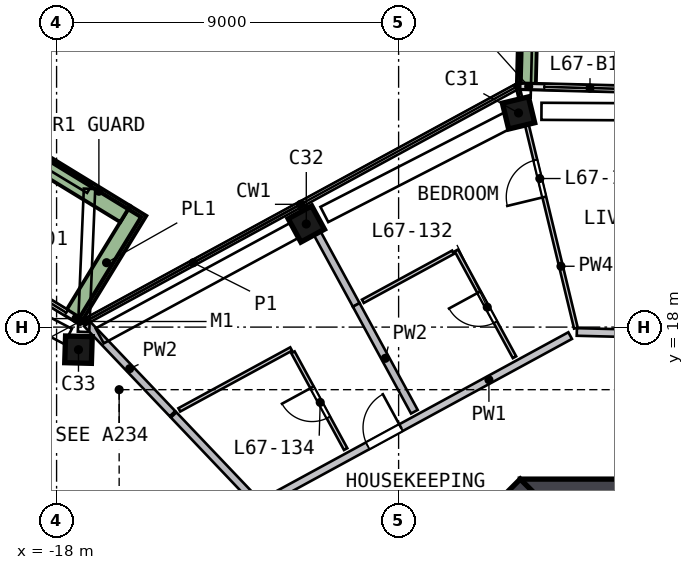
"""IFC4 building model, lengths in metres.
Left out: names, types, materials, properties, quantities, classifications, styles, units other than length and angle.
Written with IfcOpenShell. Run it as: python <this file> out.ifc"""

import sys

from ifc_helpers import new_model, si_unit, direction, frame, frame_2d, origin, origin_2d, place, context, subcontext, project, spatial, rectangle, extrude, element, fill, save


model = new_model("IFC4")
c1 = context("Model", 3, precision=1e-05, world=origin(), true_north=direction((0.0, 1.0)))
c2 = subcontext(c1, "Body", "Model", "MODEL_VIEW")
j1 = project(units=[si_unit("LENGTHUNIT", "METRE"), si_unit("PLANEANGLEUNIT", "RADIAN")], contexts=[c1])
p1 = place(None, origin())
s1 = spatial("IfcSite", under=j1, at=p1, CompositionType="ELEMENT")
p2 = place(p1, origin())
s2 = spatial("IfcBuilding", under=s1, at=p2, CompositionType="ELEMENT")
p3 = place(p2, frame((0.0, 0.0, 274.0)))
s3 = spatial("IfcBuildingStorey", under=s2, at=p3, CompositionType="ELEMENT", Elevation=274.0)
p4 = place(p3, frame((-5.709, 23.669, 0.0), z_axis=(-0.112281885, -0.028051466, 0.99328037), x_axis=(0.965671679, 0.232561936, 0.115728794)))
e1 = element("IfcColumn", 1, at=p4, inside=s3, PredefinedType="COLUMN", context=c2, shape_type="SweptSolid", body=[
    extrude(rectangle(XDim=0.7, YDim=0.7, at=origin_2d()), origin(), (0.0, 0.0, 1.0), 3.211),
])
p5 = place(p3, frame((-11.311, 20.78, 0.0), z_axis=(-0.0984061, -0.054678505, 0.993643045), x_axis=(-0.872632983, -0.475225292, -0.112572636)))
e2 = element("IfcColumn", 2, at=p5, inside=s3, PredefinedType="COLUMN", context=c2, shape_type="SweptSolid", body=[
    extrude(rectangle(XDim=0.7, YDim=0.7, at=origin_2d()), origin(), (0.0, 0.0, 1.0), 3.21),
])
p6 = place(p3, frame((-17.324, 17.506, 0.0), z_axis=(-0.082544533, -0.083076588, 0.993118664), x_axis=(0.996274725, -0.031838565, 0.080143487)))
e3 = element("IfcColumn", 3, at=p6, inside=s3, PredefinedType="COLUMN", context=c2, shape_type="SweptSolid", body=[
    extrude(rectangle(XDim=0.7, YDim=0.7, at=origin_2d()), origin(), (0.0, 0.0, 1.0), 3.212),
])
p7 = place(p3, frame((5.799, 13.775, 0.0), z_axis=(0.0, 0.0, 1.0), x_axis=(-1.0, 0.0, 0.0)))
e4 = element("IfcWall", 4, at=p7, inside=s3, PredefinedType="SHEAR", context=c2, shape_type="SweptSolid", body=[
    extrude(rectangle(XDim=11.598, YDim=0.45, at=frame_2d((5.799, 0.0))), origin(), (0.0, 0.0, 1.0), 3.5),
])
p8 = place(p7, frame((4.899, 0.0, 0.0)))
e5 = element("IfcOpeningElement", 5, at=p8, cuts=e4, PredefinedType="OPENING", context=c2, shape_type="SweptSolid", body=[
    extrude(rectangle(XDim=1.8, YDim=2.1, at=frame_2d((0.9, 1.05))), frame((0.0, 0.235, 0.0), z_axis=(0.0, -1.0, 0.0), x_axis=(1.0, 0.0, 0.0)), (0.0, 0.0, 1.0), 0.47),
])
p9 = place(p3, frame((-5.64, 13.841, 0.0), z_axis=(0.0, 0.0, 1.0), x_axis=(-0.707106781, -0.707106781, 0.0)))
e6 = element("IfcWall", 6, at=p9, inside=s3, PredefinedType="SHEAR", context=c2, shape_type="SweptSolid", body=[
    extrude(rectangle(XDim=11.598, YDim=0.45, at=frame_2d((5.799, 0.0))), origin(), (0.0, 0.0, 1.0), 3.5),
])
p10 = place(p3, frame((-17.405, 18.172, 0.0), z_axis=(0.0, 0.0, 1.0), x_axis=(-0.853215818, 0.52155802, 0.0)))
e7 = element("IfcWall", 7, at=p10, inside=s3, PredefinedType="SOLIDWALL", context=c2, shape_type="SweptSolid", body=[
    extrude(rectangle(XDim=3.2, YDim=0.15, at=frame_2d((1.6, 0.0))), origin(), (0.0, 0.0, 1.0), 2.525),
])
p11 = place(p10, frame((0.4, 0.0, 0.0)))
e8 = element("IfcOpeningElement", 8, at=p11, cuts=e7, PredefinedType="OPENING", context=c2, shape_type="SweptSolid", body=[
    extrude(rectangle(XDim=2.4, YDim=2.4, at=frame_2d((1.2, 1.2))), frame((0.0, 0.085, 0.0), z_axis=(0.0, -1.0, 0.0), x_axis=(1.0, 0.0, 0.0)), (0.0, 0.0, 1.0), 0.17),
])
p12 = place(p3, frame((-2.365, 24.25, 0.0), z_axis=(0.0, 0.0, 1.0), x_axis=(-0.999685462, 0.025079416, 0.0)))
e9 = element("IfcWall", 9, at=p12, inside=s3, PredefinedType="SOLIDWALL", context=c2, shape_type="SweptSolid", body=[
    extrude(rectangle(XDim=3.427, YDim=0.15, at=frame_2d((1.713, 0.0))), origin(), (0.0, 0.0, 1.0), 2.525),
])
p13 = place(p12, frame((0.4, 0.0, 0.0)))
e10 = element("IfcOpeningElement", 10, at=p13, cuts=e9, PredefinedType="OPENING", context=c2, shape_type="SweptSolid", body=[
    extrude(rectangle(XDim=2.4, YDim=2.4, at=frame_2d((1.2, 1.2))), frame((0.0, 0.085, 0.0), z_axis=(0.0, -1.0, 0.0), x_axis=(1.0, 0.0, 0.0)), (0.0, 0.0, 1.0), 0.17),
])
p14 = place(p3, frame((-5.571, 27.107, 0.0), z_axis=(0.0, 0.0, 1.0), x_axis=(-0.025145864, -0.999683793, 0.0)))
e11 = element("IfcWall", 11, at=p14, inside=s3, PredefinedType="SOLIDWALL", context=c2, shape_type="SweptSolid", body=[
    extrude(rectangle(XDim=2.699, YDim=0.5, at=frame_2d((1.35, 0.0))), origin(), (0.0, 0.0, 1.0), 0.7),
])
p15 = place(p3, frame((-17.519, 18.33, 0.0), z_axis=(0.0, 0.0, 1.0), x_axis=(0.521638307, 0.853166735, 0.0)))
e12 = element("IfcWall", 12, at=p15, inside=s3, PredefinedType="SOLIDWALL", context=c2, shape_type="SweptSolid", body=[
    extrude(rectangle(XDim=3.199, YDim=0.5, at=frame_2d((1.6, 0.0))), origin(), (0.0, 0.0, 1.0), 0.7),
])
p16 = place(p3, frame((-16.194, 20.977, 0.0), z_axis=(0.0, 0.0, 1.0), x_axis=(-0.853203348, 0.521578419, 0.0)))
e13 = element("IfcWall", 13, at=p16, inside=s3, PredefinedType="SOLIDWALL", context=c2, shape_type="SweptSolid", body=[
    extrude(rectangle(XDim=7.383, YDim=0.5, at=frame_2d((3.691, 0.0))), origin(), (0.0, 0.0, 1.0), 0.7),
])
p17 = place(p3, frame((-12.493, 13.418, 0.0), z_axis=(0.0, 0.0, 1.0), x_axis=(0.878320972, 0.478071407, 0.0)))
e14 = element("IfcWall", 14, at=p17, inside=s3, PredefinedType="SOLIDWALL", context=c2, shape_type="SweptSolid", body=[
    extrude(rectangle(XDim=9.117, YDim=0.2, at=frame_2d((4.558, 0.0))), origin(), (0.0, 0.0, 1.0), 3.19),
])
p18 = place(p17, frame((3.05, 0.0, 0.0)))
e15 = element("IfcOpeningElement", 15, at=p18, cuts=e14, PredefinedType="OPENING", context=c2, shape_type="SweptSolid", body=[
    extrude(rectangle(XDim=1.0, YDim=2.1, at=frame_2d((0.5, 1.05))), frame((0.0, 0.11, 0.0), z_axis=(0.0, -1.0, 0.0), x_axis=(1.0, 0.0, 0.0)), (0.0, 0.0, 1.0), 0.22),
])
p19 = place(p3, frame((-4.311, 17.872, 0.0), z_axis=(0.0, 0.0, 1.0), x_axis=(0.99968415, -0.025131651, 0.0)))
e16 = element("IfcWall", 16, at=p19, inside=s3, PredefinedType="SOLIDWALL", context=c2, shape_type="SweptSolid", body=[
    extrude(rectangle(XDim=9.316, YDim=0.2, at=frame_2d((4.658, 0.0))), origin(), (0.0, 0.0, 1.0), 3.19),
])
p20 = place(p19, frame((1.9, 0.0, 0.0)))
e17 = element("IfcOpeningElement", 17, at=p20, cuts=e16, PredefinedType="OPENING", context=c2, shape_type="SweptSolid", body=[
    extrude(rectangle(XDim=1.0, YDim=2.1, at=frame_2d((0.5, 1.05))), frame((0.0, 0.11, 0.0), z_axis=(0.0, -1.0, 0.0), x_axis=(1.0, 0.0, 0.0)), (0.0, 0.0, 1.0), 0.22),
])
p21 = place(p3, frame((-23.212, 16.212, 0.0), z_axis=(0.0, 0.0, 1.0), x_axis=(0.853189263, -0.521601458, 0.0)))
e18 = element("IfcWall", 18, at=p21, inside=s3, PredefinedType="SOLIDWALL", context=c2, shape_type="SweptSolid", body=[
    extrude(rectangle(XDim=10.302, YDim=0.2, at=frame_2d((5.151, 0.0))), origin(), (0.0, 0.0, 1.0), 3.19),
])
p22 = place(p21, frame((2.5, 0.0, 0.0)))
e19 = element("IfcOpeningElement", 19, at=p22, cuts=e18, PredefinedType="OPENING", context=c2, shape_type="SweptSolid", body=[
    extrude(rectangle(XDim=1.0, YDim=2.1, at=frame_2d((0.5, 1.05))), frame((0.0, 0.11, 0.0), z_axis=(0.0, -1.0, 0.0), x_axis=(1.0, 0.0, 0.0)), (0.0, 0.0, 1.0), 0.22),
])
p23 = place(p3, frame((-17.203, 18.09, 0.0), z_axis=(0.0, 0.0, 1.0), x_axis=(0.689106643, -0.724659944, 0.0)))
e20 = element("IfcWall", 20, at=p23, inside=s3, PredefinedType="SOLIDWALL", context=c2, shape_type="SweptSolid", body=[
    extrude(rectangle(XDim=3.269, YDim=0.2, at=frame_2d((1.634, 0.0))), origin(), (0.0, 0.0, 1.0), 3.19),
])
p24 = place(p3, frame((-14.919, 15.688, 0.0), z_axis=(0.0, 0.0, 1.0), x_axis=(0.689161356, -0.724607912, 0.0)))
e21 = element("IfcWall", 21, at=p24, inside=s3, PredefinedType="SOLIDWALL", context=c2, shape_type="SweptSolid", body=[
    extrude(rectangle(XDim=3.161, YDim=0.2, at=frame_2d((1.581, 0.0))), origin(), (0.0, 0.0, 1.0), 3.19),
])
p25 = place(p3, frame((-10.115, 18.584, 0.0), z_axis=(0.0, 0.0, 1.0), x_axis=(-0.478092371, 0.878309561, 0.0)))
e22 = element("IfcWall", 22, at=p25, inside=s3, PredefinedType="SOLIDWALL", context=c2, shape_type="SweptSolid", body=[
    extrude(rectangle(XDim=2.95, YDim=0.2, at=frame_2d((1.475, 0.0))), origin(), (0.0, 0.0, 1.0), 3.19),
])
p26 = place(p3, frame((-8.585, 15.773, 0.0), z_axis=(0.0, 0.0, 1.0), x_axis=(-0.478071486, 0.878320929, 0.0)))
e23 = element("IfcWall", 23, at=p26, inside=s3, PredefinedType="SOLIDWALL", context=c2, shape_type="SweptSolid", body=[
    extrude(rectangle(XDim=3.2, YDim=0.2, at=frame_2d((1.6, 0.0))), origin(), (0.0, 0.0, 1.0), 3.19),
])
p27 = place(p3, frame((-14.77, 15.822, 0.0), z_axis=(0.0, 0.0, 1.0), x_axis=(0.878304625, 0.478101439, 0.0)))
e24 = element("IfcWall", 24, at=p27, inside=s3, PredefinedType="PARTITIONING", context=c2, shape_type="SweptSolid", body=[
    extrude(rectangle(XDim=3.35, YDim=0.1, at=frame_2d((1.675, 0.0))), origin(), (0.0, 0.0, 1.0), 3.19),
])
p28 = place(p3, frame((-10.393, 14.789, 0.0), z_axis=(0.0, 0.0, 1.0), x_axis=(-0.478091061, 0.878310274, 0.0)))
e25 = element("IfcWall", 25, at=p28, inside=s3, PredefinedType="PARTITIONING", context=c2, shape_type="SweptSolid", body=[
    extrude(rectangle(XDim=2.9, YDim=0.1, at=frame_2d((1.45, 0.0))), origin(), (0.0, 0.0, 1.0), 3.19),
])
p29 = place(p28, frame((0.95, 0.0, 0.0)))
e26 = element("IfcOpeningElement", 26, at=p29, cuts=e25, PredefinedType="OPENING", context=c2, shape_type="SweptSolid", body=[
    extrude(rectangle(XDim=0.9, YDim=2.1, at=frame_2d((0.45, 1.05))), frame((0.0, 0.06, 0.0), z_axis=(0.0, -1.0, 0.0), x_axis=(1.0, 0.0, 0.0)), (0.0, 0.0, 1.0), 0.12),
])
p30 = place(p3, frame((-7.568, 19.97, 0.0), z_axis=(0.0, 0.0, 1.0), x_axis=(-0.878296088, -0.478117121, 0.0)))
e27 = element("IfcWall", 27, at=p30, inside=s3, PredefinedType="PARTITIONING", context=c2, shape_type="SweptSolid", body=[
    extrude(rectangle(XDim=2.7, YDim=0.1, at=frame_2d((1.35, 0.0))), origin(), (0.0, 0.0, 1.0), 3.19),
])
p31 = place(p3, frame((-5.95, 17.207, 0.0), z_axis=(0.0, 0.0, 1.0), x_axis=(-0.478098304, 0.878306331, 0.0)))
e28 = element("IfcWall", 28, at=p31, inside=s3, PredefinedType="PARTITIONING", context=c2, shape_type="SweptSolid", body=[
    extrude(rectangle(XDim=3.2, YDim=0.1, at=frame_2d((1.6, 0.0))), origin(), (0.0, 0.0, 1.0), 3.19),
])
p32 = place(p31, frame((1.05, 0.0, 0.0)))
e29 = element("IfcOpeningElement", 29, at=p32, cuts=e28, PredefinedType="OPENING", context=c2, shape_type="SweptSolid", body=[
    extrude(rectangle(XDim=0.9, YDim=2.1, at=frame_2d((0.45, 1.05))), frame((0.0, 0.06, 0.0), z_axis=(0.0, -1.0, 0.0), x_axis=(1.0, 0.0, 0.0)), (0.0, 0.0, 1.0), 0.12),
])
p33 = place(p3, frame((-4.335, 17.973, 0.0), z_axis=(0.0, 0.0, 1.0), x_axis=(-0.234490664, 0.972118372, 0.0)))
e30 = element("IfcWall", 30, at=p33, inside=s3, PredefinedType="PARTITIONING", context=c2, shape_type="SweptSolid", body=[
    extrude(rectangle(XDim=6.476, YDim=0.1, at=frame_2d((3.238, 0.0))), origin(), (0.0, 0.0, 1.0), 3.19),
])
p34 = place(p33, frame((3.55, 0.0, 0.0)))
e31 = element("IfcOpeningElement", 31, at=p34, cuts=e30, PredefinedType="OPENING", context=c2, shape_type="SweptSolid", body=[
    extrude(rectangle(XDim=1.0, YDim=2.1, at=frame_2d((0.5, 1.05))), frame((0.0, 0.06, 0.0), z_axis=(0.0, -1.0, 0.0), x_axis=(1.0, 0.0, 0.0)), (0.0, 0.0, 1.0), 0.12),
])
p35 = place(p11, origin())
e32 = element("IfcDoor", 32, at=p35, inside=s3, OperationType="SLIDING_TO_LEFT", PredefinedType="DOOR", context=c2, shape_type="SweptSolid", body=[
    extrude(rectangle(XDim=2.4, YDim=2.4, at=frame_2d((1.2, 1.2))), frame((0.0, 0.025, 0.0), z_axis=(0.0, -1.0, 0.0), x_axis=(1.0, 0.0, 0.0)), (0.0, 0.0, 1.0), 0.05),
])
fill(e8, e32)
p36 = place(p13, origin())
e33 = element("IfcDoor", 33, at=p36, inside=s3, OperationType="SLIDING_TO_RIGHT", PredefinedType="DOOR", context=c2, shape_type="SweptSolid", body=[
    extrude(rectangle(XDim=2.4, YDim=2.4, at=frame_2d((1.2, 1.2))), frame((0.0, 0.025, 0.0), z_axis=(0.0, -1.0, 0.0), x_axis=(1.0, 0.0, 0.0)), (0.0, 0.0, 1.0), 0.05),
])
fill(e10, e33)
p37 = place(p34, origin())
e34 = element("IfcDoor", 34, at=p37, inside=s3, OperationType="SINGLE_SWING_LEFT", PredefinedType="DOOR", context=c2, shape_type="SweptSolid", body=[
    extrude(rectangle(XDim=1.0, YDim=2.1, at=frame_2d((0.5, 1.05))), frame((0.0, 0.025, 0.0), z_axis=(0.0, -1.0, 0.0), x_axis=(1.0, 0.0, 0.0)), (0.0, 0.0, 1.0), 0.05),
])
fill(e31, e34)
p38 = place(p32, origin())
e35 = element("IfcDoor", 35, at=p38, inside=s3, OperationType="SINGLE_SWING_RIGHT", PredefinedType="DOOR", context=c2, shape_type="SweptSolid", body=[
    extrude(rectangle(XDim=0.9, YDim=2.1, at=frame_2d((0.45, 1.05))), frame((0.0, 0.025, 0.0), z_axis=(0.0, -1.0, 0.0), x_axis=(1.0, 0.0, 0.0)), (0.0, 0.0, 1.0), 0.05),
])
fill(e29, e35)
p39 = place(p18, origin())
e36 = element("IfcDoor", 36, at=p39, inside=s3, OperationType="SINGLE_SWING_RIGHT", PredefinedType="DOOR", context=c2, shape_type="SweptSolid", body=[
    extrude(rectangle(XDim=1.0, YDim=2.1, at=frame_2d((0.5, 1.05))), frame((0.0, 0.025, 0.0), z_axis=(0.0, -1.0, 0.0), x_axis=(1.0, 0.0, 0.0)), (0.0, 0.0, 1.0), 0.05),
])
fill(e15, e36)
p40 = place(p29, origin())
e37 = element("IfcDoor", 37, at=p40, inside=s3, OperationType="SINGLE_SWING_RIGHT", PredefinedType="DOOR", context=c2, shape_type="SweptSolid", body=[
    extrude(rectangle(XDim=0.9, YDim=2.1, at=frame_2d((0.45, 1.05))), frame((0.0, 0.025, 0.0), z_axis=(0.0, -1.0, 0.0), x_axis=(1.0, 0.0, 0.0)), (0.0, 0.0, 1.0), 0.05),
])
fill(e26, e37)
save(model, sys.argv[1])
